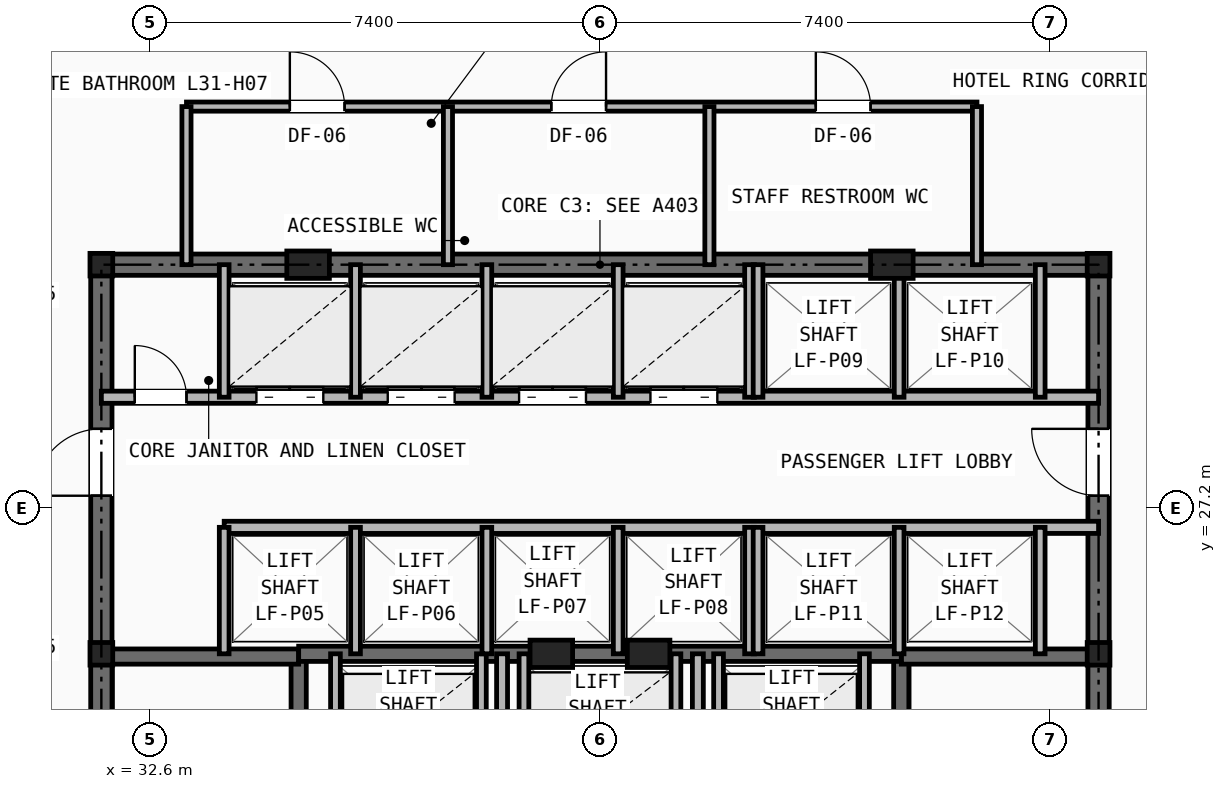
"""IFC4 building model, lengths in metres.
Left out: names, types, materials, properties, quantities, classifications, styles, units other than length and angle.
Written with IfcOpenShell. Run it as: python <this file> out.ifc"""

import sys

from ifc_helpers import new_model, si_unit, direction, frame, frame_2d, origin, origin_2d, place, context, subcontext, project, spatial, rectangle, i_section, extrude, element, fill, save


model = new_model("IFC4")
c1 = context("Model", 3, precision=1e-05, world=origin(), true_north=direction((0.0, 1.0)))
c2 = subcontext(c1, "Body", "Model", "MODEL_VIEW")
j1 = project(units=[si_unit("LENGTHUNIT", "METRE"), si_unit("PLANEANGLEUNIT", "RADIAN")], contexts=[c1])
p1 = place(None, origin())
s1 = spatial("IfcSite", under=j1, at=p1, CompositionType="ELEMENT")
p2 = place(p1, origin())
s2 = spatial("IfcBuilding", under=s1, at=p2, CompositionType="ELEMENT")
p3 = place(p2, frame((0.0, 0.0, 108.6)))
s3 = spatial("IfcBuildingStorey", under=s2, at=p3, CompositionType="ELEMENT", Elevation=108.6)
for number, where, z_axis, x_axis in (
    (1, (31.8, 24.8, 0.0), (0.0, 0.0, 1.0), (1.0, 0.0, 0.0)),
    (2, (48.2, 24.8, 0.0), (0.0, 0.0, 1.0), (1.0, 0.0, 0.0)),
    (3, (31.8, 31.2, 0.0), (0.0, 0.0, 1.0), (1.0, 0.0, 0.0)),
    (4, (48.2, 31.2, 0.0), (0.0, 0.0, 1.0), (1.0, 0.0, 0.0)),
):
    element("IfcColumn", number, at=place(p3, frame(where, z_axis=z_axis, x_axis=x_axis)), inside=s3, PredefinedType="COLUMN", context=c2, shape_type="SweptSolid", body=[
        extrude(i_section(OverallWidth=0.374, OverallDepth=0.372, WebThickness=0.016, FlangeThickness=0.026, at=origin_2d()), origin(), (0.0, 0.0, 1.0), 3.2),
    ])
for number, where, z_axis, x_axis in (
    (5, (35.2, 31.2, 0.0), (0.0, 0.0, 1.0), (1.0, 0.0, 0.0)),
    (6, (44.8, 31.2, 0.0), (0.0, 0.0, 1.0), (1.0, 0.0, 0.0)),
    (7, (39.2, 24.8, 0.0), (0.0, 0.0, 1.0), (1.0, 0.0, 0.0)),
    (8, (40.8, 24.8, 0.0), (0.0, 0.0, 1.0), (1.0, 0.0, 0.0)),
):
    element("IfcColumn", number, at=place(p3, frame(where, z_axis=z_axis, x_axis=x_axis)), inside=s3, PredefinedType="PILASTER", context=c2, shape_type="SweptSolid", body=[
        extrude(rectangle(XDim=0.7, YDim=0.45, at=origin_2d()), origin(), (0.0, 0.0, 1.0), 3.2),
    ])
p4 = place(p3, frame((31.8, 31.2, 0.0), z_axis=(0.0, 0.0, 1.0), x_axis=(1.0, 0.0, 0.0)))
e9 = element("IfcWall", 9, at=p4, inside=s3, PredefinedType="SHEAR", context=c2, shape_type="SweptSolid", body=[
    extrude(rectangle(XDim=16.4, YDim=0.35, at=frame_2d((8.2, 0.0))), origin(), (0.0, 0.0, 1.0), 2.94),
])
p5 = place(p3, frame((31.8, 16.4, 0.0), z_axis=(0.0, 0.0, 1.0), x_axis=(0.0, 1.0, 0.0)))
e10 = element("IfcWall", 10, at=p5, inside=s3, PredefinedType="SHEAR", context=c2, shape_type="SweptSolid", body=[
    extrude(rectangle(XDim=14.8, YDim=0.35, at=frame_2d((7.4, 0.0))), origin(), (0.0, 0.0, 1.0), 2.94),
])
p6 = place(p5, frame((11.0, 0.0, 0.0)))
e11 = element("IfcOpeningElement", 11, at=p6, cuts=e10, PredefinedType="OPENING", context=c2, shape_type="SweptSolid", body=[
    extrude(rectangle(XDim=1.1, YDim=2.15, at=frame_2d((0.55, 1.075))), frame((0.0, 0.185, 0.0), z_axis=(0.0, -1.0, 0.0), x_axis=(1.0, 0.0, 0.0)), (0.0, 0.0, 1.0), 0.37),
])
p7 = place(p3, frame((48.2, 16.4, 0.0), z_axis=(0.0, 0.0, 1.0), x_axis=(0.0, 1.0, 0.0)))
e12 = element("IfcWall", 12, at=p7, inside=s3, PredefinedType="SHEAR", context=c2, shape_type="SweptSolid", body=[
    extrude(rectangle(XDim=14.8, YDim=0.35, at=frame_2d((7.4, 0.0))), origin(), (0.0, 0.0, 1.0), 2.94),
])
p8 = place(p7, frame((11.0, 0.0, 0.0)))
e13 = element("IfcOpeningElement", 13, at=p8, cuts=e12, PredefinedType="OPENING", context=c2, shape_type="SweptSolid", body=[
    extrude(rectangle(XDim=1.1, YDim=2.15, at=frame_2d((0.55, 1.075))), frame((0.0, 0.185, 0.0), z_axis=(0.0, -1.0, 0.0), x_axis=(1.0, 0.0, 0.0)), (0.0, 0.0, 1.0), 0.37),
])
p9 = place(p3, frame((35.045, 16.4, 0.0), z_axis=(0.0, 0.0, 1.0), x_axis=(0.0, 1.0, 0.0)))
e14 = element("IfcWall", 14, at=p9, inside=s3, PredefinedType="SHEAR", context=c2, shape_type="SweptSolid", body=[
    extrude(rectangle(XDim=8.4, YDim=0.25, at=frame_2d((4.2, 0.0))), origin(), (0.0, 0.0, 1.0), 2.94),
])
p10 = place(p9, frame((0.45, 0.0, 0.0)))
e15 = element("IfcOpeningElement", 15, at=p10, cuts=e14, PredefinedType="OPENING", context=c2, shape_type="SweptSolid", body=[
    extrude(rectangle(XDim=0.95, YDim=2.1, at=frame_2d((0.475, 1.05))), frame((0.0, 0.135, 0.0), z_axis=(0.0, -1.0, 0.0), x_axis=(1.0, 0.0, 0.0)), (0.0, 0.0, 1.0), 0.27),
])
p11 = place(p3, frame((31.8, 24.755, 0.0), z_axis=(0.0, 0.0, 1.0), x_axis=(1.0, 0.0, 0.0)))
e16 = element("IfcWall", 16, at=p11, inside=s3, PredefinedType="SHEAR", context=c2, shape_type="SweptSolid", body=[
    extrude(rectangle(XDim=3.245, YDim=0.25, at=frame_2d((1.623, 0.0))), origin(), (0.0, 0.0, 1.0), 2.94),
])
p12 = place(p3, frame((44.955, 16.4, 0.0), z_axis=(0.0, 0.0, 1.0), x_axis=(0.0, 1.0, 0.0)))
e17 = element("IfcWall", 17, at=p12, inside=s3, PredefinedType="SHEAR", context=c2, shape_type="SweptSolid", body=[
    extrude(rectangle(XDim=8.4, YDim=0.25, at=frame_2d((4.2, 0.0))), origin(), (0.0, 0.0, 1.0), 2.94),
])
p13 = place(p12, frame((0.45, 0.0, 0.0)))
e18 = element("IfcOpeningElement", 18, at=p13, cuts=e17, PredefinedType="OPENING", context=c2, shape_type="SweptSolid", body=[
    extrude(rectangle(XDim=0.95, YDim=2.1, at=frame_2d((0.475, 1.05))), frame((0.0, 0.135, 0.0), z_axis=(0.0, -1.0, 0.0), x_axis=(1.0, 0.0, 0.0)), (0.0, 0.0, 1.0), 0.27),
])
p14 = place(p3, frame((44.955, 24.755, 0.0), z_axis=(0.0, 0.0, 1.0), x_axis=(1.0, 0.0, 0.0)))
e19 = element("IfcWall", 19, at=p14, inside=s3, PredefinedType="SHEAR", context=c2, shape_type="SweptSolid", body=[
    extrude(rectangle(XDim=3.245, YDim=0.25, at=frame_2d((1.623, 0.0))), origin(), (0.0, 0.0, 1.0), 2.94),
])
p15 = place(p3, frame((35.045, 24.8, 0.0), z_axis=(0.0, 0.0, 1.0), x_axis=(1.0, 0.0, 0.0)))
e20 = element("IfcWall", 20, at=p15, inside=s3, PredefinedType="SHEAR", context=c2, shape_type="SweptSolid", body=[
    extrude(rectangle(XDim=9.91, YDim=0.25, at=frame_2d((4.955, 0.0))), origin(), (0.0, 0.0, 1.0), 2.94),
])
p16 = place(p3, frame((38.39, 16.4, 0.0), z_axis=(0.0, 0.0, 1.0), x_axis=(0.0, 1.0, 0.0)))
e21 = element("IfcWall", 21, at=p16, inside=s3, PredefinedType="PARTITIONING", context=c2, shape_type="SweptSolid", body=[
    extrude(rectangle(XDim=8.4, YDim=0.18, at=frame_2d((4.2, 0.0))), origin(), (0.0, 0.0, 1.0), 2.391),
])
p17 = place(p16, frame((3.8, 0.0, 0.0)))
e22 = element("IfcOpeningElement", 22, at=p17, cuts=e21, PredefinedType="OPENING", context=c2, shape_type="SweptSolid", body=[
    extrude(rectangle(XDim=0.95, YDim=2.1, at=frame_2d((0.475, 1.05))), frame((0.0, 0.1, 0.0), z_axis=(0.0, -1.0, 0.0), x_axis=(1.0, 0.0, 0.0)), (0.0, 0.0, 1.0), 0.2),
])
p18 = place(p3, frame((41.61, 16.4, 0.0), z_axis=(0.0, 0.0, 1.0), x_axis=(0.0, 1.0, 0.0)))
e23 = element("IfcWall", 23, at=p18, inside=s3, PredefinedType="PARTITIONING", context=c2, shape_type="SweptSolid", body=[
    extrude(rectangle(XDim=8.4, YDim=0.18, at=frame_2d((4.2, 0.0))), origin(), (0.0, 0.0, 1.0), 2.391),
])
for number, where, z_axis, x_axis in (
    (24, (35.65, 22.48, 0.0), (0.0, 0.0, 1.0), (0.0, 1.0, 0.0)),
    (25, (38.05, 22.48, 0.0), (0.0, 0.0, 1.0), (0.0, 1.0, 0.0)),
    (26, (41.95, 22.48, 0.0), (0.0, 0.0, 1.0), (0.0, 1.0, 0.0)),
    (27, (44.35, 22.48, 0.0), (0.0, 0.0, 1.0), (0.0, 1.0, 0.0)),
    (28, (38.75, 22.48, 0.0), (0.0, 0.0, 1.0), (0.0, 1.0, 0.0)),
    (29, (41.25, 22.48, 0.0), (0.0, 0.0, 1.0), (0.0, 1.0, 0.0)),
):
    element("IfcWall", number, at=place(p3, frame(where, z_axis=z_axis, x_axis=x_axis)), inside=s3, PredefinedType="SOLIDWALL", context=c2, shape_type="SweptSolid", body=[
        extrude(rectangle(XDim=2.32, YDim=0.16, at=frame_2d((1.16, 0.0))), origin(), (0.0, 0.0, 1.0), 2.94),
    ])
p19 = place(p3, frame((31.8, 29.02, 0.0), z_axis=(0.0, 0.0, 1.0), x_axis=(1.0, 0.0, 0.0)))
e30 = element("IfcWall", 30, at=p19, inside=s3, PredefinedType="SOLIDWALL", context=c2, shape_type="SweptSolid", body=[
    extrude(rectangle(XDim=16.4, YDim=0.2, at=frame_2d((8.2, 0.0))), origin(), (0.0, 0.0, 1.0), 2.391),
])
p20 = place(p19, frame((0.55, 0.0, 0.0)))
e31 = element("IfcOpeningElement", 31, at=p20, cuts=e30, PredefinedType="OPENING", context=c2, shape_type="SweptSolid", body=[
    extrude(rectangle(XDim=0.85, YDim=2.05, at=frame_2d((0.425, 1.025))), frame((0.0, 0.11, 0.0), z_axis=(0.0, -1.0, 0.0), x_axis=(1.0, 0.0, 0.0)), (0.0, 0.0, 1.0), 0.22),
])
p21 = place(p19, frame((2.55, 0.0, 0.0)))
e32 = element("IfcOpeningElement", 32, at=p21, cuts=e30, PredefinedType="OPENING", context=c2, shape_type="SweptSolid", body=[
    extrude(rectangle(XDim=1.1, YDim=2.15, at=frame_2d((0.55, 1.075))), frame((0.0, 0.11, 0.0), z_axis=(0.0, -1.0, 0.0), x_axis=(1.0, 0.0, 0.0)), (0.0, 0.0, 1.0), 0.22),
])
p22 = place(p19, frame((4.71, 0.0, 0.0)))
e33 = element("IfcOpeningElement", 33, at=p22, cuts=e30, PredefinedType="OPENING", context=c2, shape_type="SweptSolid", body=[
    extrude(rectangle(XDim=1.1, YDim=2.15, at=frame_2d((0.55, 1.075))), frame((0.0, 0.11, 0.0), z_axis=(0.0, -1.0, 0.0), x_axis=(1.0, 0.0, 0.0)), (0.0, 0.0, 1.0), 0.22),
])
p23 = place(p19, frame((6.87, 0.0, 0.0)))
e34 = element("IfcOpeningElement", 34, at=p23, cuts=e30, PredefinedType="OPENING", context=c2, shape_type="SweptSolid", body=[
    extrude(rectangle(XDim=1.1, YDim=2.15, at=frame_2d((0.55, 1.075))), frame((0.0, 0.11, 0.0), z_axis=(0.0, -1.0, 0.0), x_axis=(1.0, 0.0, 0.0)), (0.0, 0.0, 1.0), 0.22),
])
p24 = place(p19, frame((9.03, 0.0, 0.0)))
e35 = element("IfcOpeningElement", 35, at=p24, cuts=e30, PredefinedType="OPENING", context=c2, shape_type="SweptSolid", body=[
    extrude(rectangle(XDim=1.1, YDim=2.15, at=frame_2d((0.55, 1.075))), frame((0.0, 0.11, 0.0), z_axis=(0.0, -1.0, 0.0), x_axis=(1.0, 0.0, 0.0)), (0.0, 0.0, 1.0), 0.22),
])
p25 = place(p3, frame((33.82, 26.88, 0.0), z_axis=(0.0, 0.0, 1.0), x_axis=(1.0, 0.0, 0.0)))
e36 = element("IfcWall", 36, at=p25, inside=s3, PredefinedType="SOLIDWALL", context=c2, shape_type="SweptSolid", body=[
    extrude(rectangle(XDim=14.38, YDim=0.2, at=frame_2d((7.19, 0.0))), origin(), (0.0, 0.0, 1.0), 2.391),
])
p26 = place(p3, frame((33.82, 29.02, 0.0), z_axis=(0.0, 0.0, 1.0), x_axis=(0.0, 1.0, 0.0)))
e37 = element("IfcWall", 37, at=p26, inside=s3, PredefinedType="SOLIDWALL", context=c2, shape_type="SweptSolid", body=[
    extrude(rectangle(XDim=2.18, YDim=0.16, at=frame_2d((1.09, 0.0))), origin(), (0.0, 0.0, 1.0), 2.391),
])
p27 = place(p3, frame((33.82, 24.8, 0.0), z_axis=(0.0, 0.0, 1.0), x_axis=(0.0, 1.0, 0.0)))
e38 = element("IfcWall", 38, at=p27, inside=s3, PredefinedType="SOLIDWALL", context=c2, shape_type="SweptSolid", body=[
    extrude(rectangle(XDim=2.08, YDim=0.16, at=frame_2d((1.04, 0.0))), origin(), (0.0, 0.0, 1.0), 2.94),
])
for number, where, z_axis, x_axis in (
    (39, (35.98, 29.02, 0.0), (0.0, 0.0, 1.0), (0.0, 1.0, 0.0)),
    (40, (38.14, 29.02, 0.0), (0.0, 0.0, 1.0), (0.0, 1.0, 0.0)),
    (41, (40.3, 29.02, 0.0), (0.0, 0.0, 1.0), (0.0, 1.0, 0.0)),
    (42, (42.46, 29.02, 0.0), (0.0, 0.0, 1.0), (0.0, 1.0, 0.0)),
):
    element("IfcWall", number, at=place(p3, frame(where, z_axis=z_axis, x_axis=x_axis)), inside=s3, PredefinedType="SOLIDWALL", context=c2, shape_type="SweptSolid", body=[
        extrude(rectangle(XDim=2.18, YDim=0.16, at=frame_2d((1.09, 0.0))), origin(), (0.0, 0.0, 1.0), 2.391),
    ])
for number, where, z_axis, x_axis in (
    (43, (35.98, 24.8, 0.0), (0.0, 0.0, 1.0), (0.0, 1.0, 0.0)),
    (44, (38.14, 24.8, 0.0), (0.0, 0.0, 1.0), (0.0, 1.0, 0.0)),
    (45, (40.3, 24.8, 0.0), (0.0, 0.0, 1.0), (0.0, 1.0, 0.0)),
    (46, (42.46, 24.8, 0.0), (0.0, 0.0, 1.0), (0.0, 1.0, 0.0)),
):
    element("IfcWall", number, at=place(p3, frame(where, z_axis=z_axis, x_axis=x_axis)), inside=s3, PredefinedType="SOLIDWALL", context=c2, shape_type="SweptSolid", body=[
        extrude(rectangle(XDim=2.08, YDim=0.16, at=frame_2d((1.04, 0.0))), origin(), (0.0, 0.0, 1.0), 2.94),
    ])
for number, where, z_axis, x_axis in (
    (47, (42.6, 29.02, 0.0), (0.0, 0.0, 1.0), (0.0, 1.0, 0.0)),
    (48, (44.92, 29.02, 0.0), (0.0, 0.0, 1.0), (0.0, 1.0, 0.0)),
    (49, (47.24, 29.02, 0.0), (0.0, 0.0, 1.0), (0.0, 1.0, 0.0)),
):
    element("IfcWall", number, at=place(p3, frame(where, z_axis=z_axis, x_axis=x_axis)), inside=s3, PredefinedType="SOLIDWALL", context=c2, shape_type="SweptSolid", body=[
        extrude(rectangle(XDim=2.18, YDim=0.16, at=frame_2d((1.09, 0.0))), origin(), (0.0, 0.0, 1.0), 2.391),
    ])
for number, where, z_axis, x_axis in (
    (50, (42.6, 24.8, 0.0), (0.0, 0.0, 1.0), (0.0, 1.0, 0.0)),
    (51, (44.92, 24.8, 0.0), (0.0, 0.0, 1.0), (0.0, 1.0, 0.0)),
    (52, (47.24, 24.8, 0.0), (0.0, 0.0, 1.0), (0.0, 1.0, 0.0)),
):
    element("IfcWall", number, at=place(p3, frame(where, z_axis=z_axis, x_axis=x_axis)), inside=s3, PredefinedType="SOLIDWALL", context=c2, shape_type="SweptSolid", body=[
        extrude(rectangle(XDim=2.08, YDim=0.16, at=frame_2d((1.04, 0.0))), origin(), (0.0, 0.0, 1.0), 2.94),
    ])
p28 = place(p3, frame((33.2, 33.8, 0.0), z_axis=(0.0, 0.0, 1.0), x_axis=(1.0, 0.0, 0.0)))
e53 = element("IfcWall", 53, at=p28, inside=s3, PredefinedType="PARTITIONING", context=c2, shape_type="SweptSolid", body=[
    extrude(rectangle(XDim=13.0, YDim=0.15, at=frame_2d((6.5, 0.0))), origin(), (0.0, 0.0, 1.0), 2.94),
])
p29 = place(p28, frame((1.7, 0.0, 0.0)))
e54 = element("IfcOpeningElement", 54, at=p29, cuts=e53, PredefinedType="OPENING", context=c2, shape_type="SweptSolid", body=[
    extrude(rectangle(XDim=0.9, YDim=2.1, at=frame_2d((0.45, 1.05))), frame((0.0, 0.085, 0.0), z_axis=(0.0, -1.0, 0.0), x_axis=(1.0, 0.0, 0.0)), (0.0, 0.0, 1.0), 0.17),
])
p30 = place(p28, frame((6.0, 0.0, 0.0)))
e55 = element("IfcOpeningElement", 55, at=p30, cuts=e53, PredefinedType="OPENING", context=c2, shape_type="SweptSolid", body=[
    extrude(rectangle(XDim=0.9, YDim=2.1, at=frame_2d((0.45, 1.05))), frame((0.0, 0.085, 0.0), z_axis=(0.0, -1.0, 0.0), x_axis=(1.0, 0.0, 0.0)), (0.0, 0.0, 1.0), 0.17),
])
p31 = place(p28, frame((10.35, 0.0, 0.0)))
e56 = element("IfcOpeningElement", 56, at=p31, cuts=e53, PredefinedType="OPENING", context=c2, shape_type="SweptSolid", body=[
    extrude(rectangle(XDim=0.9, YDim=2.1, at=frame_2d((0.45, 1.05))), frame((0.0, 0.085, 0.0), z_axis=(0.0, -1.0, 0.0), x_axis=(1.0, 0.0, 0.0)), (0.0, 0.0, 1.0), 0.17),
])
for number, where, z_axis, x_axis in (
    (57, (33.2, 31.2, 0.0), (0.0, 0.0, 1.0), (0.0, 1.0, 0.0)),
    (58, (46.2, 31.2, 0.0), (0.0, 0.0, 1.0), (0.0, 1.0, 0.0)),
    (59, (37.5, 31.2, 0.0), (0.0, 0.0, 1.0), (0.0, 1.0, 0.0)),
    (60, (41.8, 31.2, 0.0), (0.0, 0.0, 1.0), (0.0, 1.0, 0.0)),
):
    element("IfcWall", number, at=place(p3, frame(where, z_axis=z_axis, x_axis=x_axis)), inside=s3, PredefinedType="PARTITIONING", context=c2, shape_type="SweptSolid", body=[
        extrude(rectangle(XDim=2.6, YDim=0.15, at=frame_2d((1.3, 0.0))), origin(), (0.0, 0.0, 1.0), 2.391),
    ])
p32 = place(p20, origin())
e61 = element("IfcDoor", 61, at=p32, inside=s3, OperationType="SINGLE_SWING_LEFT", PredefinedType="DOOR", context=c2, shape_type="SweptSolid", body=[
    extrude(rectangle(XDim=0.85, YDim=2.05, at=frame_2d((0.425, 1.025))), frame((0.0, 0.025, 0.0), z_axis=(0.0, -1.0, 0.0), x_axis=(1.0, 0.0, 0.0)), (0.0, 0.0, 1.0), 0.05),
])
fill(e31, e61)
p33 = place(p6, origin())
e62 = element("IfcDoor", 62, at=p33, inside=s3, OperationType="SINGLE_SWING_LEFT", PredefinedType="DOOR", context=c2, shape_type="SweptSolid", body=[
    extrude(rectangle(XDim=1.1, YDim=2.15, at=frame_2d((0.55, 1.075))), frame((0.0, 0.025, 0.0), z_axis=(0.0, -1.0, 0.0), x_axis=(1.0, 0.0, 0.0)), (0.0, 0.0, 1.0), 0.05),
])
fill(e11, e62)
p34 = place(p8, origin())
e63 = element("IfcDoor", 63, at=p34, inside=s3, OperationType="SINGLE_SWING_RIGHT", PredefinedType="DOOR", context=c2, shape_type="SweptSolid", body=[
    extrude(rectangle(XDim=1.1, YDim=2.15, at=frame_2d((0.55, 1.075))), frame((0.0, 0.025, 0.0), z_axis=(0.0, -1.0, 0.0), x_axis=(1.0, 0.0, 0.0)), (0.0, 0.0, 1.0), 0.05),
])
fill(e13, e63)
p35 = place(p21, origin())
e64 = element("IfcDoor", 64, at=p35, inside=s3, OperationType="DOUBLE_DOOR_SLIDING", PredefinedType="DOOR", context=c2, shape_type="SweptSolid", body=[
    extrude(rectangle(XDim=1.1, YDim=2.15, at=frame_2d((0.55, 1.075))), frame((0.0, 0.025, 0.0), z_axis=(0.0, -1.0, 0.0), x_axis=(1.0, 0.0, 0.0)), (0.0, 0.0, 1.0), 0.05),
])
fill(e32, e64)
p36 = place(p22, origin())
e65 = element("IfcDoor", 65, at=p36, inside=s3, OperationType="DOUBLE_DOOR_SLIDING", PredefinedType="DOOR", context=c2, shape_type="SweptSolid", body=[
    extrude(rectangle(XDim=1.1, YDim=2.15, at=frame_2d((0.55, 1.075))), frame((0.0, 0.025, 0.0), z_axis=(0.0, -1.0, 0.0), x_axis=(1.0, 0.0, 0.0)), (0.0, 0.0, 1.0), 0.05),
])
fill(e33, e65)
p37 = place(p23, origin())
e66 = element("IfcDoor", 66, at=p37, inside=s3, OperationType="DOUBLE_DOOR_SLIDING", PredefinedType="DOOR", context=c2, shape_type="SweptSolid", body=[
    extrude(rectangle(XDim=1.1, YDim=2.15, at=frame_2d((0.55, 1.075))), frame((0.0, 0.025, 0.0), z_axis=(0.0, -1.0, 0.0), x_axis=(1.0, 0.0, 0.0)), (0.0, 0.0, 1.0), 0.05),
])
fill(e34, e66)
p38 = place(p24, origin())
e67 = element("IfcDoor", 67, at=p38, inside=s3, OperationType="DOUBLE_DOOR_SLIDING", PredefinedType="DOOR", context=c2, shape_type="SweptSolid", body=[
    extrude(rectangle(XDim=1.1, YDim=2.15, at=frame_2d((0.55, 1.075))), frame((0.0, 0.025, 0.0), z_axis=(0.0, -1.0, 0.0), x_axis=(1.0, 0.0, 0.0)), (0.0, 0.0, 1.0), 0.05),
])
fill(e35, e67)
p39 = place(p29, origin())
e68 = element("IfcDoor", 68, at=p39, inside=s3, OperationType="SINGLE_SWING_LEFT", PredefinedType="DOOR", context=c2, shape_type="SweptSolid", body=[
    extrude(rectangle(XDim=0.9, YDim=2.1, at=frame_2d((0.45, 1.05))), frame((0.0, 0.025, 0.0), z_axis=(0.0, -1.0, 0.0), x_axis=(1.0, 0.0, 0.0)), (0.0, 0.0, 1.0), 0.05),
])
fill(e54, e68)
p40 = place(p30, origin())
e69 = element("IfcDoor", 69, at=p40, inside=s3, OperationType="SINGLE_SWING_RIGHT", PredefinedType="DOOR", context=c2, shape_type="SweptSolid", body=[
    extrude(rectangle(XDim=0.9, YDim=2.1, at=frame_2d((0.45, 1.05))), frame((0.0, 0.025, 0.0), z_axis=(0.0, -1.0, 0.0), x_axis=(1.0, 0.0, 0.0)), (0.0, 0.0, 1.0), 0.05),
])
fill(e55, e69)
p41 = place(p31, origin())
e70 = element("IfcDoor", 70, at=p41, inside=s3, OperationType="SINGLE_SWING_LEFT", PredefinedType="DOOR", context=c2, shape_type="SweptSolid", body=[
    extrude(rectangle(XDim=0.9, YDim=2.1, at=frame_2d((0.45, 1.05))), frame((0.0, 0.025, 0.0), z_axis=(0.0, -1.0, 0.0), x_axis=(1.0, 0.0, 0.0)), (0.0, 0.0, 1.0), 0.05),
])
fill(e56, e70)
save(model, sys.argv[1])
